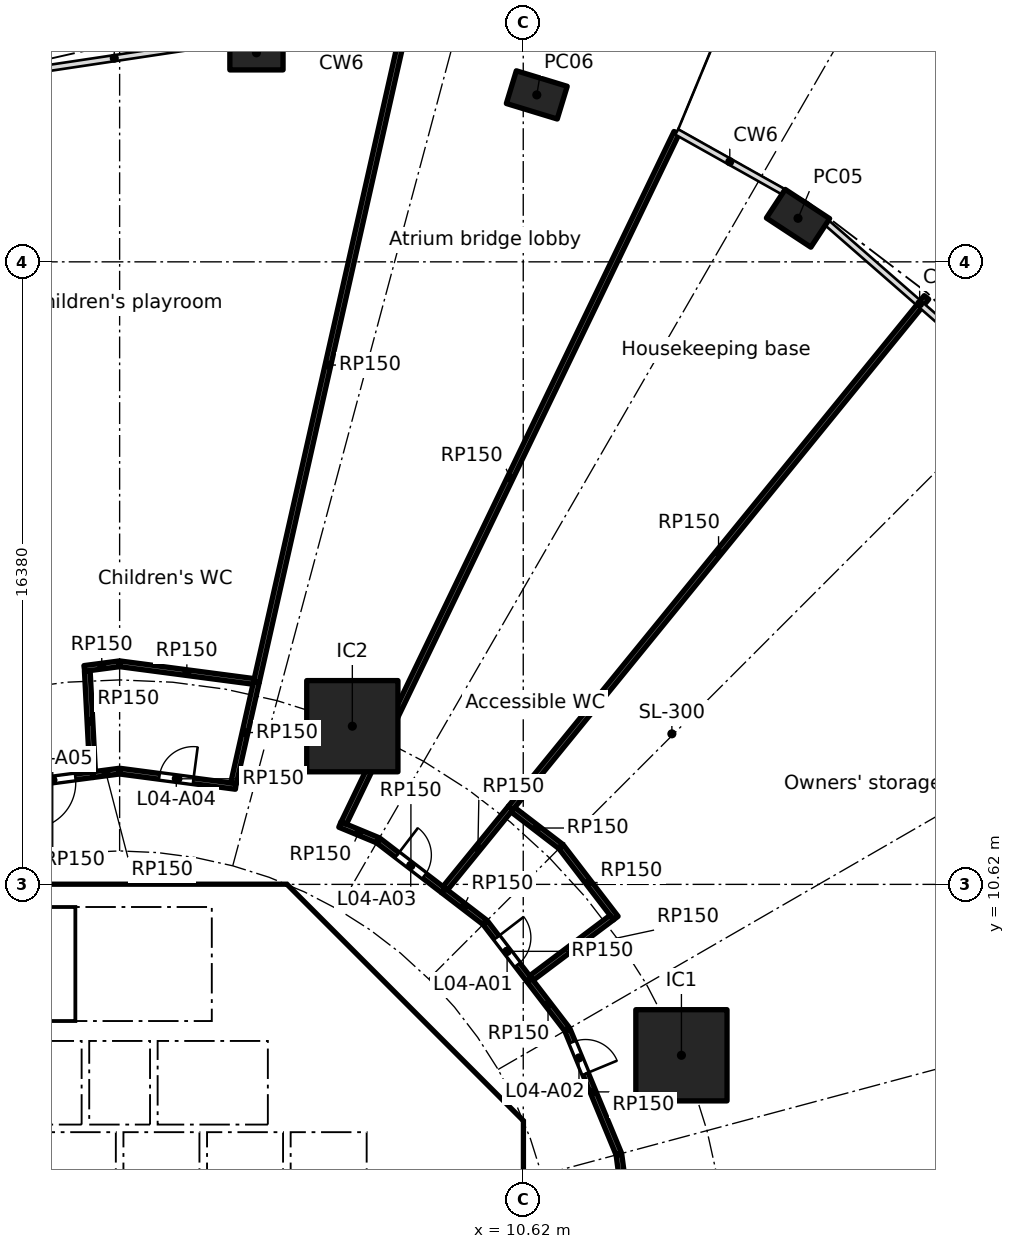
"""IFC4 building model, lengths in metres.
Left out: names, types, materials, properties, quantities, classifications, styles, units other than length and angle.
Written with IfcOpenShell. Run it as: python <this file> out.ifc"""

import sys

from ifc_helpers import new_model, si_unit, direction, frame, frame_2d, origin, origin_2d, place, context, subcontext, project, spatial, polyline, rectangle, hollow_rectangle, outline, extrude, element, fill, save


model = new_model("IFC4")
c1 = context("Model", 3, precision=1e-05, world=origin(), true_north=direction((0.0, 1.0)))
c2 = subcontext(c1, "Body", "Model", "MODEL_VIEW")
j1 = project(units=[si_unit("LENGTHUNIT", "METRE"), si_unit("PLANEANGLEUNIT", "RADIAN")], contexts=[c1])
p1 = place(None, origin())
s1 = spatial("IfcSite", under=j1, at=p1, CompositionType="ELEMENT")
p2 = place(p1, origin())
s2 = spatial("IfcBuilding", under=s1, at=p2, CompositionType="ELEMENT")
p3 = place(p2, frame((0.0, 0.0, 22.0)))
s3 = spatial("IfcBuildingStorey", under=s2, at=p3, CompositionType="ELEMENT", Elevation=22.0)
for number, where, z_axis, x_axis in (
    (1, (17.85, 28.146, 0.0), (0.0, 0.0, 1.0), (-0.836, 0.549, 0.0)),
    (2, (10.976, 31.393, 0.0), (0.0, 0.0, 1.0), (-0.957, 0.292, 0.0)),
    (3, (3.6, 32.5, 0.0), (0.0, 0.0, 1.0), (-1.0, 0.0, 0.0)),
):
    element("IfcColumn", number, at=place(p3, frame(where, z_axis=z_axis, x_axis=x_axis)), inside=s3, PredefinedType="COLUMN", context=c2, shape_type="SweptSolid", body=[
        extrude(hollow_rectangle(XDim=1.4, YDim=0.9, WallThickness=0.05, at=origin_2d()), origin(), (0.0, 0.0, 1.0), 5.0),
    ])
for number, where, z_axis, x_axis in (
    (4, (14.782, 6.123, 0.0), (0.0, 0.0, 1.0), (1.0, 0.0, 0.0)),
    (5, (6.123, 14.782, 0.0), (0.0, 0.0, 1.0), (1.0, 0.0, 0.0)),
):
    element("IfcColumn", number, at=place(p3, frame(where, z_axis=z_axis, x_axis=x_axis)), inside=s3, PredefinedType="COLUMN", context=c2, shape_type="SweptSolid", body=[
        extrude(rectangle(XDim=2.4, YDim=2.4, at=origin_2d()), origin(), (0.0, 0.0, 1.0), 5.0),
    ])
p4 = place(p3, frame((9.988, 4.613, 0.0), z_axis=(0.0, 0.0, 1.0), x_axis=(-0.707106781187, 0.707106781187, 0.0)))
e6 = element("IfcWall", 6, at=p4, inside=s3, PredefinedType="SHEAR", context=c2, shape_type="SweptSolid", body=[
    extrude(rectangle(XDim=7.602, YDim=0.6, at=frame_2d((3.801, 0.0))), origin(), (0.0, 0.0, 1.0), 4.74),
])
p5 = place(p4, frame((3.201, 0.0, 0.0)))
e7 = element("IfcOpeningElement", 7, at=p5, cuts=e6, PredefinedType="OPENING", context=c2, shape_type="SweptSolid", body=[
    extrude(rectangle(XDim=1.2, YDim=2.1, at=frame_2d((0.6, 1.05))), frame((0.0, 0.31, 0.0), z_axis=(0.0, -1.0, 0.0), x_axis=(1.0, 0.0, 0.0)), (0.0, 0.0, 1.0), 0.62),
])
p6 = place(p3, frame((4.0, 4.3, 0.0), z_axis=(0.0, 0.0, 1.0), x_axis=(0.0, 1.0, 0.0)))
e8 = element("IfcWall", 8, at=p6, inside=s3, PredefinedType="SOLIDWALL", context=c2, shape_type="SweptSolid", body=[
    extrude(rectangle(XDim=2.2, YDim=0.2, at=frame_2d((1.1, 0.0))), origin(), (0.0, 0.0, 1.0), 4.74),
])
p7 = place(p6, frame((0.55, 0.0, 0.0)))
e9 = element("IfcOpeningElement", 9, at=p7, cuts=e8, PredefinedType="OPENING", context=c2, shape_type="SweptSolid", body=[
    extrude(rectangle(XDim=1.1, YDim=2.1, at=frame_2d((0.55, 1.05))), frame((0.0, 0.11, 0.0), z_axis=(0.0, -1.0, 0.0), x_axis=(1.0, 0.0, 0.0)), (0.0, 0.0, 1.0), 0.22),
])
p8 = place(p3, frame((6.7, 4.0, 0.0), z_axis=(0.0, 0.0, 1.0), x_axis=(1.0, 0.0, 0.0)))
e10 = element("IfcWall", 10, at=p8, inside=s3, PredefinedType="SOLIDWALL", context=c2, shape_type="SweptSolid", body=[
    extrude(rectangle(XDim=3.325, YDim=0.2, at=frame_2d((1.662, 0.0))), origin(), (0.0, 0.0, 1.0), 4.74),
])
p9 = place(p8, frame((1.25, 0.0, 0.0)))
e11 = element("IfcOpeningElement", 11, at=p9, cuts=e10, PredefinedType="OPENING", context=c2, shape_type="SweptSolid", body=[
    extrude(rectangle(XDim=1.1, YDim=2.1, at=frame_2d((0.55, 1.05))), frame((0.0, 0.11, 0.0), z_axis=(0.0, -1.0, 0.0), x_axis=(1.0, 0.0, 0.0)), (0.0, 0.0, 1.0), 0.22),
])
p10 = place(p3, frame((4.0, 7.025, 0.0), z_axis=(0.0, 0.0, 1.0), x_axis=(0.0, 1.0, 0.0)))
e12 = element("IfcWall", 12, at=p10, inside=s3, PredefinedType="SOLIDWALL", context=c2, shape_type="SweptSolid", body=[
    extrude(rectangle(XDim=3.0, YDim=0.2, at=frame_2d((1.5, 0.0))), origin(), (0.0, 0.0, 1.0), 4.74),
])
p11 = place(p10, frame((0.925, 0.0, 0.0)))
e13 = element("IfcOpeningElement", 13, at=p11, cuts=e12, PredefinedType="OPENING", context=c2, shape_type="SweptSolid", body=[
    extrude(rectangle(XDim=1.1, YDim=2.1, at=frame_2d((0.55, 1.05))), frame((0.0, 0.11, 0.0), z_axis=(0.0, -1.0, 0.0), x_axis=(1.0, 0.0, 0.0)), (0.0, 0.0, 1.0), 0.22),
])
p12 = place(p3, origin())
e14 = element("IfcWall", 14, at=p12, inside=s3, PredefinedType="SHEAR", context=c2, shape_type="SweptSolid", body=[
    extrude(outline(polyline([(-4.152, 10.025), (-4.401, 9.776), (-4.825, 10.2), (-4.401, 10.625), (4.401, 10.625), (4.825, 10.2), (4.401, 9.776), (4.152, 10.025), (-4.152, 10.025)])), origin(), (0.0, 0.0, 1.0), 4.74),
])
p13 = place(p3, origin())
e15 = element("IfcWall", 15, at=p13, inside=s3, PredefinedType="SHEAR", context=c2, shape_type="SweptSolid", body=[
    extrude(outline(polyline([(9.776, -4.401), (10.025, -4.152), (10.025, -3.801), (10.025, 4.152), (9.776, 4.401), (10.2, 4.825), (10.625, 4.401), (10.625, -4.401), (10.2, -4.825), (9.776, -4.401)])), origin(), (0.0, 0.0, 1.0), 4.74),
])
for number, where, z_axis, x_axis in (
    (16, (-0.9, 4.3, 0.0), (0.0, 0.0, 1.0), (0.0, 1.0, 0.0)),
    (17, (0.9, 4.3, 0.0), (0.0, 0.0, 1.0), (0.0, 1.0, 0.0)),
):
    element("IfcWall", number, at=place(p3, frame(where, z_axis=z_axis, x_axis=x_axis)), inside=s3, PredefinedType="SOLIDWALL", context=c2, shape_type="SweptSolid", body=[
        extrude(rectangle(XDim=2.2, YDim=0.2, at=frame_2d((1.1, 0.0))), origin(), (0.0, 0.0, 1.0), 4.74),
    ])
p14 = place(p3, origin())
e18 = element("IfcWall", 18, at=p14, inside=s3, PredefinedType="SOLIDWALL", context=c2, shape_type="SweptSolid", body=[
    extrude(outline(polyline([(-6.5, 2.1), (-6.7, 2.1), (-6.7, 4.3), (6.7, 4.3), (6.7, 2.1), (6.5, 2.1), (6.5, 4.1), (4.5, 4.1), (4.5, 2.1), (4.3, 2.1), (4.3, 4.1), (2.3, 4.1), (2.3, 2.1), (2.1, 2.1), (2.1, 4.1), (0.1, 4.1), (0.1, 2.1), (-0.1, 2.1), (-0.1, 4.1), (-2.1, 4.1), (-2.1, 2.1), (-2.3, 2.1), (-2.3, 4.1), (-4.3, 4.1), (-4.3, 2.1), (-4.5, 2.1), (-4.5, 4.1), (-6.5, 4.1), (-6.5, 2.1)])), origin(), (0.0, 0.0, 1.0), 4.74),
])
p15 = place(p3, origin())
e19 = element("IfcWall", 19, at=p15, inside=s3, PredefinedType="SOLIDWALL", context=c2, shape_type="SweptSolid", body=[
    extrude(outline(polyline([(4.1, 6.5), (-4.1, 6.5), (-4.1, 7.025), (4.1, 7.025), (4.1, 6.5)])), origin(), (0.0, 0.0, 1.0), 4.74),
])
p16 = place(p3, origin())
e20 = element("IfcWall", 20, at=p16, inside=s3, PredefinedType="SOLIDWALL", context=c2, shape_type="SweptSolid", body=[
    extrude(outline(polyline([(7.025, -3.9), (6.7, -3.9), (6.7, 3.9), (7.025, 3.9), (7.025, -3.9)])), origin(), (0.0, 0.0, 1.0), 4.74),
])
p17 = place(p3, frame((-2.812, 13.23, 0.0), z_axis=(0.0, 0.0, 1.0), x_axis=(0.991438625664, 0.130573548402, 0.0)))
e21 = element("IfcWall", 21, at=p17, inside=s3, PredefinedType="PARTITIONING", context=c2, shape_type="SweptSolid", body=[
    extrude(rectangle(XDim=2.122, YDim=0.15, at=frame_2d((1.061, 0.0))), origin(), (0.0, 0.0, 1.0), 4.74),
])
p18 = place(p17, frame((0.461, 0.0, 0.0)))
e22 = element("IfcOpeningElement", 22, at=p18, cuts=e21, PredefinedType="OPENING", context=c2, shape_type="SweptSolid", body=[
    extrude(rectangle(XDim=1.2, YDim=2.1, at=frame_2d((0.6, 1.05))), frame((0.0, 0.085, 0.0), z_axis=(0.0, -1.0, 0.0), x_axis=(1.0, 0.0, 0.0)), (0.0, 0.0, 1.0), 0.17),
])
p19 = place(p3, frame((-0.929, 16.302, 0.0), z_axis=(0.0, 0.0, 1.0), x_axis=(0.991440824405, 0.130556852376, 0.0)))
e23 = element("IfcWall", 23, at=p19, inside=s3, PredefinedType="PARTITIONING", context=c2, shape_type="SweptSolid", body=[
    extrude(rectangle(XDim=0.926, YDim=0.15, at=frame_2d((0.463, 0.0))), origin(), (0.0, 0.0, 1.0), 4.74),
])
p20 = place(p3, frame((-0.712, 13.582, 0.0), z_axis=(0.0, 0.0, 1.0), x_axis=(-0.05235154686, 0.998628717563, 0.0)))
e24 = element("IfcWall", 24, at=p20, inside=s3, PredefinedType="PARTITIONING", context=c2, shape_type="SweptSolid", body=[
    extrude(rectangle(XDim=2.658, YDim=0.15, at=frame_2d((1.329, 0.0))), origin(), (0.0, 0.0, 1.0), 4.74),
])
p21 = place(p3, frame((-0.708, 13.507, 0.0), z_axis=(0.0, 0.0, 1.0), x_axis=(0.991466123966, 0.130364585024, 0.0)))
e25 = element("IfcWall", 25, at=p21, inside=s3, PredefinedType="PARTITIONING", context=c2, shape_type="SweptSolid", body=[
    extrude(rectangle(XDim=0.702, YDim=0.15, at=frame_2d((0.351, 0.0))), origin(), (0.0, 0.0, 1.0), 4.74),
])
p22 = place(p3, frame((0.012, 13.598, 0.0), z_axis=(0.0, 0.0, 1.0), x_axis=(0.991450776896, -0.130481251495, 0.0)))
e26 = element("IfcWall", 26, at=p22, inside=s3, PredefinedType="PARTITIONING", context=c2, shape_type="SweptSolid", body=[
    extrude(rectangle(XDim=3.071, YDim=0.15, at=frame_2d((1.535, 0.0))), origin(), (0.0, 0.0, 1.0), 4.74),
])
p23 = place(p22, frame((1.042, 0.0, 0.0)))
e27 = element("IfcOpeningElement", 27, at=p23, cuts=e26, PredefinedType="OPENING", context=c2, shape_type="SweptSolid", body=[
    extrude(rectangle(XDim=0.9, YDim=2.1, at=frame_2d((0.45, 1.05))), frame((0.0, 0.085, 0.0), z_axis=(0.0, -1.0, 0.0), x_axis=(1.0, 0.0, 0.0)), (0.0, 0.0, 1.0), 0.17),
])
p24 = place(p3, frame((0.012, 16.423, 0.0), z_axis=(0.0, 0.0, 1.0), x_axis=(0.991443741692, -0.130534696763, 0.0)))
e28 = element("IfcWall", 28, at=p24, inside=s3, PredefinedType="PARTITIONING", context=c2, shape_type="SweptSolid", body=[
    extrude(rectangle(XDim=3.544, YDim=0.15, at=frame_2d((1.772, 0.0))), origin(), (0.0, 0.0, 1.0), 4.74),
])
p25 = place(p3, frame((2.998, 13.281, 0.0), z_axis=(0.0, 0.0, 1.0), x_axis=(0.220197886119, 0.975455222421, 0.0)))
e29 = element("IfcWall", 29, at=p25, inside=s3, PredefinedType="PARTITIONING", context=c2, shape_type="SweptSolid", body=[
    extrude(rectangle(XDim=2.736, YDim=0.15, at=frame_2d((1.368, 0.0))), origin(), (0.0, 0.0, 1.0), 4.74),
])
p26 = place(p3, frame((3.6, 15.95, 0.0), z_axis=(0.0, 0.0, 1.0), x_axis=(0.220190709134, 0.975456842516, 0.0)))
e30 = element("IfcWall", 30, at=p26, inside=s3, PredefinedType="PARTITIONING", context=c2, shape_type="SweptSolid", body=[
    extrude(rectangle(XDim=17.088, YDim=0.15, at=frame_2d((8.544, 0.0))), origin(), (0.0, 0.0, 1.0), 4.74),
])
p27 = place(p3, frame((5.795, 12.194, 0.0), z_axis=(0.0, 0.0, 1.0), x_axis=(0.923867429555, -0.382712650179, 0.0)))
e31 = element("IfcWall", 31, at=p27, inside=s3, PredefinedType="PARTITIONING", context=c2, shape_type="SweptSolid", body=[
    extrude(rectangle(XDim=1.075, YDim=0.15, at=frame_2d((0.538, 0.0))), origin(), (0.0, 0.0, 1.0), 4.74),
])
p28 = place(p3, frame((6.809, 11.771, 0.0), z_axis=(0.0, 0.0, 1.0), x_axis=(0.793372937326, -0.608735888805, 0.0)))
e32 = element("IfcWall", 32, at=p28, inside=s3, PredefinedType="PARTITIONING", context=c2, shape_type="SweptSolid", body=[
    extrude(rectangle(XDim=2.155, YDim=0.15, at=frame_2d((1.078, 0.0))), origin(), (0.0, 0.0, 1.0), 4.74),
])
p29 = place(p28, frame((0.622, 0.0, 0.0)))
e33 = element("IfcOpeningElement", 33, at=p29, cuts=e32, PredefinedType="OPENING", context=c2, shape_type="SweptSolid", body=[
    extrude(rectangle(XDim=0.9, YDim=2.1, at=frame_2d((0.45, 1.05))), frame((0.0, 0.085, 0.0), z_axis=(0.0, -1.0, 0.0), x_axis=(1.0, 0.0, 0.0)), (0.0, 0.0, 1.0), 0.17),
])
p30 = place(p3, frame((8.519, 10.459, 0.0), z_axis=(0.0, 0.0, 1.0), x_axis=(0.793371316762, -0.6087380009, 0.0)))
e34 = element("IfcWall", 34, at=p30, inside=s3, PredefinedType="PARTITIONING", context=c2, shape_type="SweptSolid", body=[
    extrude(rectangle(XDim=1.371, YDim=0.15, at=frame_2d((0.686, 0.0))), origin(), (0.0, 0.0, 1.0), 4.74),
])
p31 = place(p3, frame((8.567, 10.517, 0.0), z_axis=(0.0, 0.0, 1.0), x_axis=(0.631573271363, 0.775316195432, 0.0)))
e35 = element("IfcWall", 35, at=p31, inside=s3, PredefinedType="PARTITIONING", context=c2, shape_type="SweptSolid", body=[
    extrude(rectangle(XDim=2.726, YDim=0.15, at=frame_2d((1.363, 0.0))), origin(), (0.0, 0.0, 1.0), 4.74),
])
p32 = place(p3, frame((9.624, 9.607, 0.0), z_axis=(0.0, 0.0, 1.0), x_axis=(0.608754453805, -0.793358692504, 0.0)))
e36 = element("IfcWall", 36, at=p32, inside=s3, PredefinedType="PARTITIONING", context=c2, shape_type="SweptSolid", body=[
    extrude(rectangle(XDim=1.888, YDim=0.15, at=frame_2d((0.944, 0.0))), origin(), (0.0, 0.0, 1.0), 4.74),
])
p33 = place(p32, frame((0.488, 0.0, 0.0)))
e37 = element("IfcOpeningElement", 37, at=p33, cuts=e36, PredefinedType="OPENING", context=c2, shape_type="SweptSolid", body=[
    extrude(rectangle(XDim=0.9, YDim=2.1, at=frame_2d((0.45, 1.05))), frame((0.0, 0.085, 0.0), z_axis=(0.0, -1.0, 0.0), x_axis=(1.0, 0.0, 0.0)), (0.0, 0.0, 1.0), 0.17),
])
p34 = place(p3, frame((10.348, 12.585, 0.0), z_axis=(0.0, 0.0, 1.0), x_axis=(0.793328373205, -0.608793965368, 0.0)))
e38 = element("IfcWall", 38, at=p34, inside=s3, PredefinedType="PARTITIONING", context=c2, shape_type="SweptSolid", body=[
    extrude(rectangle(XDim=1.584, YDim=0.15, at=frame_2d((0.792, 0.0))), origin(), (0.0, 0.0, 1.0), 4.74),
])
p35 = place(p3, frame((10.288, 12.631, 0.0), z_axis=(0.0, 0.0, 1.0), x_axis=(0.631546535922, 0.77533797338, 0.0)))
e39 = element("IfcWall", 39, at=p35, inside=s3, PredefinedType="PARTITIONING", context=c2, shape_type="SweptSolid", body=[
    extrude(rectangle(XDim=17.325, YDim=0.15, at=frame_2d((8.663, 0.0))), origin(), (0.0, 0.0, 1.0), 4.74),
])
p36 = place(p3, frame((10.774, 8.109, 0.0), z_axis=(0.0, 0.0, 1.0), x_axis=(0.608716251771, -0.793388003961, 0.0)))
e40 = element("IfcWall", 40, at=p36, inside=s3, PredefinedType="PARTITIONING", context=c2, shape_type="SweptSolid", body=[
    extrude(rectangle(XDim=1.638, YDim=0.15, at=frame_2d((0.819, 0.0))), origin(), (0.0, 0.0, 1.0), 4.74),
])
p37 = place(p3, frame((11.621, 11.604, 0.0), z_axis=(0.0, 0.0, 1.0), x_axis=(0.608759688573, -0.793354675771, 0.0)))
e41 = element("IfcWall", 41, at=p37, inside=s3, PredefinedType="PARTITIONING", context=c2, shape_type="SweptSolid", body=[
    extrude(rectangle(XDim=2.358, YDim=0.15, at=frame_2d((1.179, 0.0))), origin(), (0.0, 0.0, 1.0), 4.74),
])
p38 = place(p3, frame((11.782, 6.789, 0.0), z_axis=(0.0, 0.0, 1.0), x_axis=(0.382677866108, -0.923881838111, 0.0)))
e42 = element("IfcWall", 42, at=p38, inside=s3, PredefinedType="PARTITIONING", context=c2, shape_type="SweptSolid", body=[
    extrude(rectangle(XDim=3.527, YDim=0.15, at=frame_2d((1.763, 0.0))), origin(), (0.0, 0.0, 1.0), 4.74),
])
p39 = place(p38, frame((0.346, 0.0, 0.0)))
e43 = element("IfcOpeningElement", 43, at=p39, cuts=e42, PredefinedType="OPENING", context=c2, shape_type="SweptSolid", body=[
    extrude(rectangle(XDim=0.9, YDim=2.1, at=frame_2d((0.45, 1.05))), frame((0.0, 0.085, 0.0), z_axis=(0.0, -1.0, 0.0), x_axis=(1.0, 0.0, 0.0)), (0.0, 0.0, 1.0), 0.17),
])
p40 = place(p3, frame((12.951, 9.748, 0.0), z_axis=(0.0, 0.0, 1.0), x_axis=(-0.798970748419, -0.601369888813, 0.0)))
e44 = element("IfcWall", 44, at=p40, inside=s3, PredefinedType="PARTITIONING", context=c2, shape_type="SweptSolid", body=[
    extrude(rectangle(XDim=2.65, YDim=0.15, at=frame_2d((1.325, 0.0))), origin(), (0.0, 0.0, 1.0), 4.74),
])
p41 = place(p3, frame((13.138, 3.508, 0.0), z_axis=(0.0, 0.0, 1.0), x_axis=(0.130526735914, -0.991444789795, 0.0)))
e45 = element("IfcWall", 45, at=p41, inside=s3, PredefinedType="PARTITIONING", context=c2, shape_type="SweptSolid", body=[
    extrude(rectangle(XDim=1.749, YDim=0.15, at=frame_2d((0.875, 0.0))), origin(), (0.0, 0.0, 1.0), 4.74),
])
p42 = place(p3, frame((14.654, 30.398, 0.0), z_axis=(0.0, 0.0, 1.0), x_axis=(-0.434261119912, -0.900787033506, 0.0)))
e46 = element("IfcWall", 46, at=p42, inside=s3, PredefinedType="PARTITIONING", context=c2, shape_type="SweptSolid", body=[
    extrude(rectangle(XDim=20.166, YDim=0.15, at=frame_2d((10.083, 0.0))), origin(), (0.0, 0.0, 1.0), 4.74),
])
p43 = place(p3, frame((32.253, 4.281, 0.0), z_axis=(0.0, 0.0, 1.0), x_axis=(-0.991305479384, -0.131580570535, 0.0)))
e47 = element("IfcWall", 47, at=p43, inside=s3, PredefinedType="PARTITIONING", context=c2, shape_type="SweptSolid", body=[
    extrude(rectangle(XDim=18.978, YDim=0.15, at=frame_2d((9.489, 0.0))), origin(), (0.0, 0.0, 1.0), 4.74),
])
p44 = place(p7, origin())
e48 = element("IfcDoor", 48, at=p44, inside=s3, OperationType="DOUBLE_DOOR_SLIDING", PredefinedType="DOOR", context=c2, shape_type="SweptSolid", body=[
    extrude(rectangle(XDim=1.1, YDim=2.1, at=frame_2d((0.55, 1.05))), frame((0.0, 0.025, 0.0), z_axis=(0.0, -1.0, 0.0), x_axis=(1.0, 0.0, 0.0)), (0.0, 0.0, 1.0), 0.05),
])
fill(e9, e48)
p45 = place(p9, frame((1.1, 0.0, 0.0), x_axis=(-1.0, 0.0, 0.0)))
e49 = element("IfcDoor", 49, at=p45, inside=s3, OperationType="SINGLE_SWING_RIGHT", PredefinedType="DOOR", context=c2, shape_type="SweptSolid", body=[
    extrude(rectangle(XDim=1.1, YDim=2.1, at=frame_2d((0.55, 1.05))), frame((0.0, 0.025, 0.0), z_axis=(0.0, -1.0, 0.0), x_axis=(1.0, 0.0, 0.0)), (0.0, 0.0, 1.0), 0.05),
])
fill(e11, e49)
p46 = place(p11, origin())
e50 = element("IfcDoor", 50, at=p46, inside=s3, OperationType="SINGLE_SWING_LEFT", PredefinedType="DOOR", context=c2, shape_type="SweptSolid", body=[
    extrude(rectangle(XDim=1.1, YDim=2.1, at=frame_2d((0.55, 1.05))), frame((0.0, 0.025, 0.0), z_axis=(0.0, -1.0, 0.0), x_axis=(1.0, 0.0, 0.0)), (0.0, 0.0, 1.0), 0.05),
])
fill(e13, e50)
p47 = place(p5, origin())
e51 = element("IfcDoor", 51, at=p47, inside=s3, OperationType="SINGLE_SWING_LEFT", PredefinedType="DOOR", context=c2, shape_type="SweptSolid", body=[
    extrude(rectangle(XDim=1.2, YDim=2.1, at=frame_2d((0.6, 1.05))), frame((0.0, 0.025, 0.0), z_axis=(0.0, -1.0, 0.0), x_axis=(1.0, 0.0, 0.0)), (0.0, 0.0, 1.0), 0.05),
])
fill(e7, e51)
p48 = place(p33, origin())
e52 = element("IfcDoor", 52, at=p48, inside=s3, OperationType="SINGLE_SWING_LEFT", PredefinedType="DOOR", context=c2, shape_type="SweptSolid", body=[
    extrude(rectangle(XDim=0.9, YDim=2.1, at=frame_2d((0.45, 1.05))), frame((0.0, 0.025, 0.0), z_axis=(0.0, -1.0, 0.0), x_axis=(1.0, 0.0, 0.0)), (0.0, 0.0, 1.0), 0.05),
])
fill(e37, e52)
p49 = place(p39, origin())
e53 = element("IfcDoor", 53, at=p49, inside=s3, OperationType="SINGLE_SWING_RIGHT", PredefinedType="DOOR", context=c2, shape_type="SweptSolid", body=[
    extrude(rectangle(XDim=0.9, YDim=2.1, at=frame_2d((0.45, 1.05))), frame((0.0, 0.025, 0.0), z_axis=(0.0, -1.0, 0.0), x_axis=(1.0, 0.0, 0.0)), (0.0, 0.0, 1.0), 0.05),
])
fill(e43, e53)
p50 = place(p29, origin())
e54 = element("IfcDoor", 54, at=p50, inside=s3, OperationType="SINGLE_SWING_LEFT", PredefinedType="DOOR", context=c2, shape_type="SweptSolid", body=[
    extrude(rectangle(XDim=0.9, YDim=2.1, at=frame_2d((0.45, 1.05))), frame((0.0, 0.025, 0.0), z_axis=(0.0, -1.0, 0.0), x_axis=(1.0, 0.0, 0.0)), (0.0, 0.0, 1.0), 0.05),
])
fill(e33, e54)
p51 = place(p23, origin())
e55 = element("IfcDoor", 55, at=p51, inside=s3, OperationType="SINGLE_SWING_RIGHT", PredefinedType="DOOR", context=c2, shape_type="SweptSolid", body=[
    extrude(rectangle(XDim=0.9, YDim=2.1, at=frame_2d((0.45, 1.05))), frame((0.0, 0.025, 0.0), z_axis=(0.0, -1.0, 0.0), x_axis=(1.0, 0.0, 0.0)), (0.0, 0.0, 1.0), 0.05),
])
fill(e27, e55)
p52 = place(p18, frame((1.2, 0.0, 0.0), x_axis=(-1.0, 0.0, 0.0)))
e56 = element("IfcDoor", 56, at=p52, inside=s3, OperationType="SINGLE_SWING_RIGHT", PredefinedType="DOOR", context=c2, shape_type="SweptSolid", body=[
    extrude(rectangle(XDim=1.2, YDim=2.1, at=frame_2d((0.6, 1.05))), frame((0.0, 0.025, 0.0), z_axis=(0.0, -1.0, 0.0), x_axis=(1.0, 0.0, 0.0)), (0.0, 0.0, 1.0), 0.05),
])
fill(e22, e56)
save(model, sys.argv[1])
